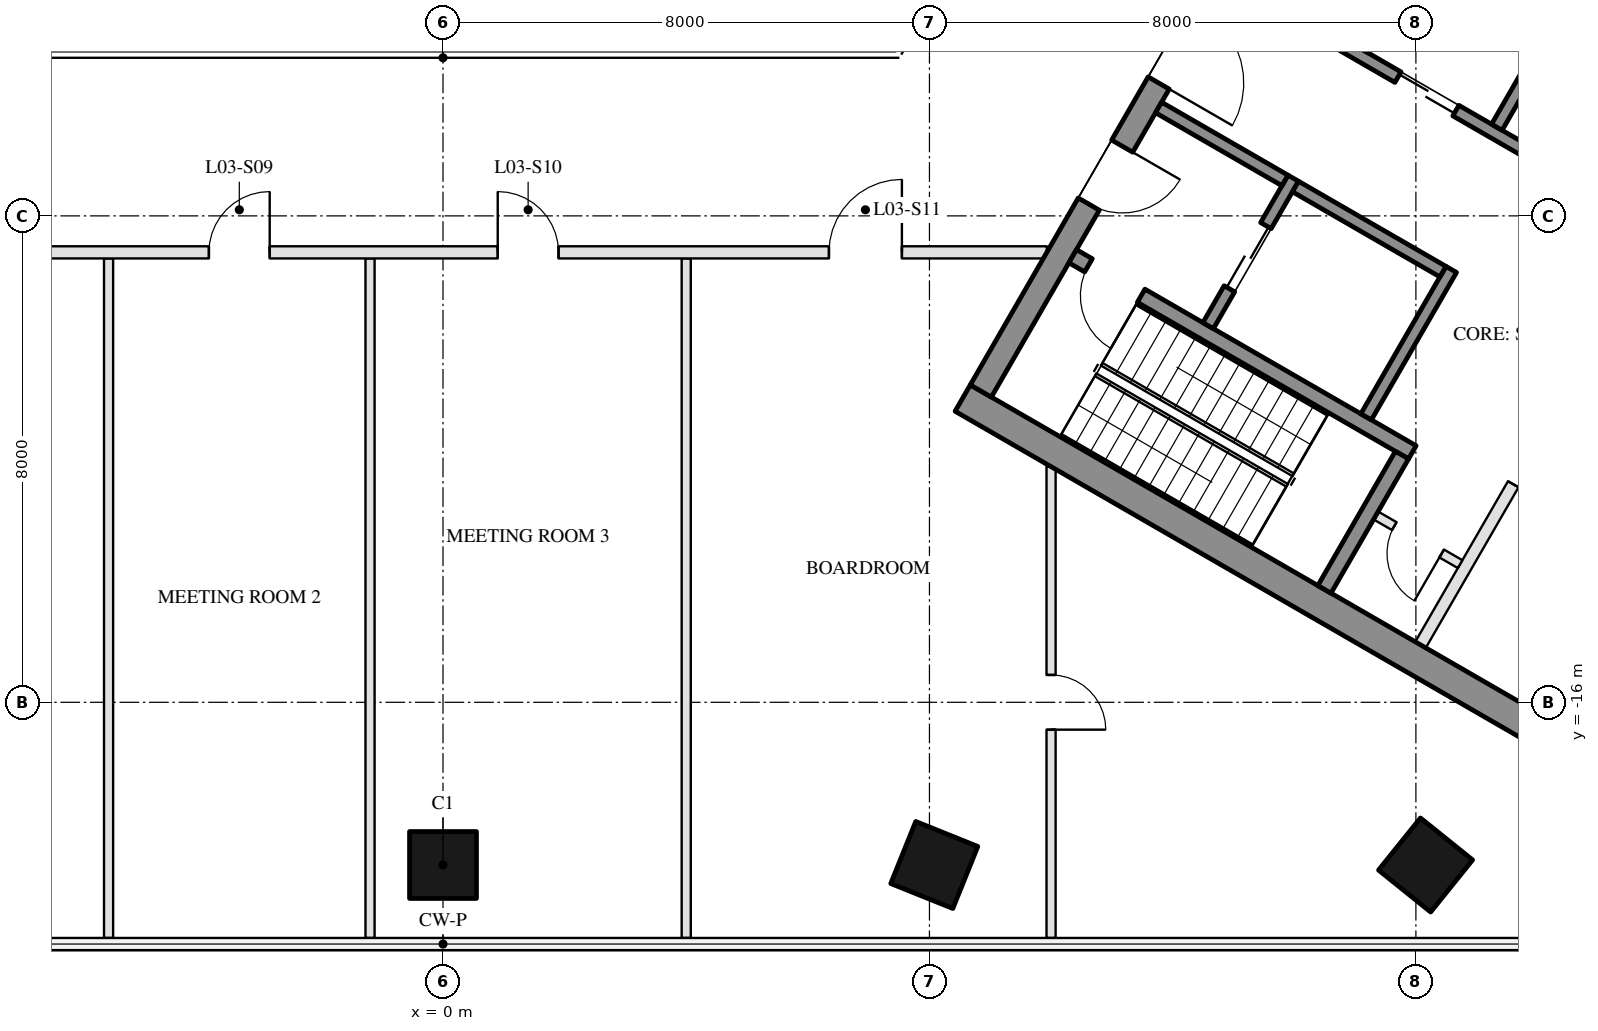
"""IFC4 building model, lengths in metres.
Left out: names, types, materials, properties, quantities, classifications, styles, units other than length and angle.
Written with IfcOpenShell. Run it as: python <this file> out.ifc"""

import sys

from ifc_helpers import new_model, si_unit, direction, frame, frame_2d, origin, origin_2d, place, context, subcontext, project, spatial, rectangle, hollow_rectangle, extrude, boolean, halfspace, element, fill, save


model = new_model("IFC4")
c1 = context("Model", 3, precision=1e-05, world=origin(), true_north=direction((0.0, 1.0)))
c2 = subcontext(c1, "Body", "Model", "MODEL_VIEW")
j1 = project(units=[si_unit("LENGTHUNIT", "METRE"), si_unit("PLANEANGLEUNIT", "RADIAN")], contexts=[c1])
p1 = place(None, origin())
s1 = spatial("IfcSite", under=j1, at=p1, CompositionType="ELEMENT")
p2 = place(p1, origin())
s2 = spatial("IfcBuilding", under=s1, at=p2, CompositionType="ELEMENT")
p3 = place(p2, frame((0.0, 0.0, 23.5)))
s3 = spatial("IfcBuildingStorey", under=s2, at=p3, CompositionType="ELEMENT", Elevation=23.5)
p4 = place(p3, frame((0.0, -18.676, 0.0), z_axis=(0.0, 0.052272189529, 0.998632874585), x_axis=(-1.0, 0.0, 0.0)))
e1 = element("IfcColumn", 1, at=p4, inside=s3, PredefinedType="COLUMN", context=c2, shape_type="SweptSolid", body=[
    boolean("DIFFERENCE", boolean("DIFFERENCE", extrude(hollow_rectangle(XDim=1.1, YDim=1.1, WallThickness=0.05, at=origin_2d()), origin(), (0.0, 0.0, 1.0), 5.007), halfspace(frame((0.0, 0.0, 0.013), z_axis=(0.0, 0.0, 1.0), x_axis=(1.0, 0.0, 0.0)), True)), halfspace(frame((0.0, 0.0, 4.996), z_axis=(0.0, 0.0, 1.0), x_axis=(1.0, 0.0, 0.0)), False)),
])
p5 = place(p3, frame((8.08, -18.676, 0.0), z_axis=(-0.021060240181, 0.052260596004, 0.998411386348), x_axis=(0.999778208433, 0.001085815533, 0.021032235927)))
e2 = element("IfcColumn", 2, at=p5, inside=s3, PredefinedType="COLUMN", context=c2, shape_type="SweptSolid", body=[
    boolean("DIFFERENCE", boolean("DIFFERENCE", extrude(hollow_rectangle(XDim=1.1, YDim=1.1, WallThickness=0.05, at=origin_2d()), origin(), (0.0, 0.0, 1.0), 5.008), halfspace(frame((0.0, 0.0, 0.014), z_axis=(0.0, 0.0, 1.0), x_axis=(1.0, 0.0, 0.0)), True)), halfspace(frame((0.0, 0.0, 4.997), z_axis=(0.0, 0.0, 1.0), x_axis=(1.0, 0.0, 0.0)), False)),
])
p6 = place(p3, frame((16.159, -18.676, 0.0), z_axis=(-0.041995221245, 0.052226075608, 0.997751892215), x_axis=(0.999116711053, 0.000712967272, 0.042015346876)))
e3 = element("IfcColumn", 3, at=p6, inside=s3, PredefinedType="COLUMN", context=c2, shape_type="SweptSolid", body=[
    boolean("DIFFERENCE", boolean("DIFFERENCE", extrude(hollow_rectangle(XDim=1.1, YDim=1.1, WallThickness=0.05, at=origin_2d()), origin(), (0.0, 0.0, 1.0), 5.011), halfspace(frame((0.0, 0.0, 0.017), z_axis=(0.0, 0.0, 1.0), x_axis=(1.0, 0.0, 0.0)), True)), halfspace(frame((0.0, 0.0, 4.999), z_axis=(0.0, 0.0, 1.0), x_axis=(1.0, 0.0, 0.0)), False)),
])
for number, where, z_axis, x_axis in (
    (4, (8.547, -10.997, 0.0), (0.0, 0.0, 1.0), (0.866, -0.5, 0.0)),
    (5, (13.797, -1.903, 0.0), (0.0, 0.0, 1.0), (0.866, -0.5, 0.0)),
):
    element("IfcWall", number, at=place(p3, frame(where, z_axis=z_axis, x_axis=x_axis)), inside=s3, PredefinedType="SHEAR", context=c2, shape_type="SweptSolid", body=[
        extrude(rectangle(XDim=15.542, YDim=0.5, at=frame_2d((7.771, 0.0))), origin(), (0.0, 0.0, 1.0), 4.7),
    ])
p7 = place(p3, frame((8.845, -10.88, 0.0), z_axis=(0.0, 0.0, 1.0), x_axis=(0.500004234368, 0.866022959057, 0.0)))
e6 = element("IfcWall", 6, at=p7, inside=s3, PredefinedType="SHEAR", context=c2, shape_type="SweptSolid", body=[
    extrude(rectangle(XDim=10.0, YDim=0.4, at=frame_2d((5.0, 0.0))), origin(), (0.0, 0.0, 1.0), 4.7),
])
p8 = place(p7, frame((3.55, 0.0, 0.0)))
e7 = element("IfcOpeningElement", 7, at=p8, cuts=e6, PredefinedType="OPENING", context=c2, shape_type="SweptSolid", body=[
    extrude(rectangle(XDim=1.1, YDim=2.1, at=frame_2d((0.55, 1.05))), frame((0.0, 0.21, 0.0), z_axis=(0.0, -1.0, 0.0), x_axis=(1.0, 0.0, 0.0)), (0.0, 0.0, 1.0), 0.42),
])
p9 = place(p7, frame((5.85, 0.0, 0.0)))
e8 = element("IfcOpeningElement", 8, at=p9, cuts=e6, PredefinedType="OPENING", context=c2, shape_type="SweptSolid", body=[
    extrude(rectangle(XDim=1.4, YDim=2.1, at=frame_2d((0.7, 1.05))), frame((0.0, 0.21, 0.0), z_axis=(0.0, -1.0, 0.0), x_axis=(1.0, 0.0, 0.0)), (0.0, 0.0, 1.0), 0.42),
])
p10 = place(p3, frame((10.356, -8.664, 0.0), z_axis=(0.0, 0.0, 1.0), x_axis=(0.866028629588, -0.499994412703, 0.0)))
e9 = element("IfcWall", 9, at=p10, inside=s3, PredefinedType="SHEAR", context=c2, shape_type="SweptSolid", body=[
    extrude(rectangle(XDim=6.45, YDim=0.25, at=frame_2d((3.225, 0.0))), origin(), (0.0, 0.0, 1.0), 4.7),
])
p11 = place(p10, frame((0.3, 0.0, 0.0)))
e10 = element("IfcOpeningElement", 10, at=p11, cuts=e9, PredefinedType="OPENING", context=c2, shape_type="SweptSolid", body=[
    extrude(rectangle(XDim=1.0, YDim=2.1, at=frame_2d((0.5, 1.05))), frame((0.0, 0.135, 0.0), z_axis=(0.0, -1.0, 0.0), x_axis=(1.0, 0.0, 0.0)), (0.0, 0.0, 1.0), 0.27),
])
p12 = place(p3, frame((14.496, -14.143, 0.0), z_axis=(0.0, 0.0, 1.0), x_axis=(0.500062241894, 0.865989465428, 0.0)))
e11 = element("IfcWall", 11, at=p12, inside=s3, PredefinedType="SHEAR", context=c2, shape_type="SweptSolid", body=[
    extrude(rectangle(XDim=2.55, YDim=0.25, at=frame_2d((1.275, 0.0))), origin(), (0.0, 0.0, 1.0), 4.7),
])
p13 = place(p3, frame((15.181, -11.305, 0.0), z_axis=(0.0, 0.0, 1.0), x_axis=(0.49994636267, 0.866056369097, 0.0)))
e12 = element("IfcWall", 12, at=p13, inside=s3, PredefinedType="SHEAR", context=c2, shape_type="SweptSolid", body=[
    extrude(rectangle(XDim=2.8, YDim=0.2, at=frame_2d((1.4, 0.0))), origin(), (0.0, 0.0, 1.0), 4.7),
])
p14 = place(p3, frame((12.583, -9.805, 0.0), z_axis=(0.0, 0.0, 1.0), x_axis=(0.49994636267, 0.866056369097, 0.0)))
e13 = element("IfcWall", 13, at=p14, inside=s3, PredefinedType="SHEAR", context=c2, shape_type="SweptSolid", body=[
    extrude(rectangle(XDim=2.8, YDim=0.2, at=frame_2d((1.4, 0.0))), origin(), (0.0, 0.0, 1.0), 4.7),
])
p15 = place(p14, frame((0.7, 0.0, 0.0)))
e14 = element("IfcOpeningElement", 14, at=p15, cuts=e13, PredefinedType="OPENING", context=c2, shape_type="SweptSolid", body=[
    extrude(rectangle(XDim=1.2, YDim=2.1, at=frame_2d((0.6, 1.05))), frame((0.0, 0.11, 0.0), z_axis=(0.0, -1.0, 0.0), x_axis=(1.0, 0.0, 0.0)), (0.0, 0.0, 1.0), 0.22),
])
p16 = place(p3, frame((11.768, -6.217, 0.0), z_axis=(0.0, 0.0, 1.0), x_axis=(0.866050077142, -0.499957262057, 0.0)))
e15 = element("IfcWall", 15, at=p16, inside=s3, PredefinedType="SHEAR", context=c2, shape_type="SweptSolid", body=[
    extrude(rectangle(XDim=2.4, YDim=0.2, at=frame_2d((1.2, 0.0))), origin(), (0.0, 0.0, 1.0), 4.7),
])
p17 = place(p3, frame((14.02, -7.517, 0.0), z_axis=(0.0, 0.0, 1.0), x_axis=(0.866034573852, -0.49998411664, 0.0)))
e16 = element("IfcWall", 16, at=p17, inside=s3, PredefinedType="SHEAR", context=c2, shape_type="SweptSolid", body=[
    extrude(rectangle(XDim=2.8, YDim=0.2, at=frame_2d((1.4, 0.0))), origin(), (0.0, 0.0, 1.0), 4.7),
])
p18 = place(p3, frame((12.968, -4.138, 0.0), z_axis=(0.0, 0.0, 1.0), x_axis=(0.866028328073, -0.49999493495, 0.0)))
e17 = element("IfcWall", 17, at=p18, inside=s3, PredefinedType="SHEAR", context=c2, shape_type="SweptSolid", body=[
    extrude(rectangle(XDim=10.16, YDim=0.2, at=frame_2d((5.08, 0.0))), origin(), (0.0, 0.0, 1.0), 4.7),
])
p19 = place(p18, frame((0.62, 0.0, 0.0)))
e18 = element("IfcOpeningElement", 18, at=p19, cuts=e17, PredefinedType="OPENING", context=c2, shape_type="SweptSolid", body=[
    extrude(rectangle(XDim=1.1, YDim=2.1, at=frame_2d((0.55, 1.05))), frame((0.0, 0.11, 0.0), z_axis=(0.0, -1.0, 0.0), x_axis=(1.0, 0.0, 0.0)), (0.0, 0.0, 1.0), 0.22),
])
p20 = place(p18, frame((3.16, 0.0, 0.0)))
e19 = element("IfcOpeningElement", 19, at=p20, cuts=e17, PredefinedType="OPENING", context=c2, shape_type="SweptSolid", body=[
    extrude(rectangle(XDim=1.1, YDim=2.1, at=frame_2d((0.55, 1.05))), frame((0.0, 0.11, 0.0), z_axis=(0.0, -1.0, 0.0), x_axis=(1.0, 0.0, 0.0)), (0.0, 0.0, 1.0), 0.22),
])
p21 = place(p18, frame((5.7, 0.0, 0.0)))
e20 = element("IfcOpeningElement", 20, at=p21, cuts=e17, PredefinedType="OPENING", context=c2, shape_type="SweptSolid", body=[
    extrude(rectangle(XDim=1.1, YDim=2.1, at=frame_2d((0.55, 1.05))), frame((0.0, 0.11, 0.0), z_axis=(0.0, -1.0, 0.0), x_axis=(1.0, 0.0, 0.0)), (0.0, 0.0, 1.0), 0.22),
])
p22 = place(p18, frame((8.24, 0.0, 0.0)))
e21 = element("IfcOpeningElement", 21, at=p22, cuts=e17, PredefinedType="OPENING", context=c2, shape_type="SweptSolid", body=[
    extrude(rectangle(XDim=1.1, YDim=2.1, at=frame_2d((0.55, 1.05))), frame((0.0, 0.11, 0.0), z_axis=(0.0, -1.0, 0.0), x_axis=(1.0, 0.0, 0.0)), (0.0, 0.0, 1.0), 0.22),
])
for number, where, z_axis, x_axis in (
    (22, (15.131, -5.272, 0.0), (0.0, 0.0, 1.0), (0.5, 0.866, 0.0)),
    (23, (17.331, -6.542, 0.0), (0.0, 0.0, 1.0), (0.5, 0.866, 0.0)),
):
    element("IfcWall", number, at=place(p3, frame(where, z_axis=z_axis, x_axis=x_axis)), inside=s3, PredefinedType="SHEAR", context=c2, shape_type="SweptSolid", body=[
        extrude(rectangle(XDim=2.0, YDim=0.2, at=frame_2d((1.0, 0.0))), origin(), (0.0, 0.0, 1.0), 4.7),
    ])
p23 = place(p3, frame((16.076, -15.055, 0.0), z_axis=(0.0, 0.0, 1.0), x_axis=(0.499995103361, 0.866028230842, 0.0)))
e24 = element("IfcWall", 24, at=p23, inside=s3, PredefinedType="PARTITIONING", context=c2, shape_type="SweptSolid", body=[
    extrude(rectangle(XDim=5.4, YDim=0.2, at=frame_2d((2.7, 0.0))), origin(), (0.0, 0.0, 1.0), 4.7),
])
p24 = place(p23, frame((3.05, 0.0, 0.0)))
e25 = element("IfcOpeningElement", 25, at=p24, cuts=e24, PredefinedType="OPENING", context=c2, shape_type="SweptSolid", body=[
    extrude(rectangle(XDim=0.9, YDim=2.1, at=frame_2d((0.45, 1.05))), frame((0.0, 0.11, 0.0), z_axis=(0.0, -1.0, 0.0), x_axis=(1.0, 0.0, 0.0)), (0.0, 0.0, 1.0), 0.22),
])
p25 = place(p3, frame((15.342, -12.928, 0.0), z_axis=(0.0, 0.0, 1.0), x_axis=(0.865989903783, -0.500061482766, 0.0)))
e26 = element("IfcWall", 26, at=p25, inside=s3, PredefinedType="PARTITIONING", context=c2, shape_type="SweptSolid", body=[
    extrude(rectangle(XDim=1.6, YDim=0.15, at=frame_2d((0.8, 0.0))), origin(), (0.0, 0.0, 1.0), 4.7),
])
p26 = place(p25, frame((0.35, 0.0, 0.0)))
e27 = element("IfcOpeningElement", 27, at=p26, cuts=e26, PredefinedType="OPENING", context=c2, shape_type="SweptSolid", body=[
    extrude(rectangle(XDim=0.9, YDim=2.1, at=frame_2d((0.45, 1.05))), frame((0.0, 0.085, 0.0), z_axis=(0.0, -1.0, 0.0), x_axis=(1.0, 0.0, 0.0)), (0.0, 0.0, 1.0), 0.17),
])
for number, where, z_axis, x_axis in (
    (28, (-5.5, -19.876, 0.0), (0.0, 0.0, 1.0), (0.0, 1.0, 0.0)),
    (29, (-1.2, -19.876, 0.0), (0.0, 0.0, 1.0), (0.0, 1.0, 0.0)),
):
    element("IfcWall", number, at=place(p3, frame(where, z_axis=z_axis, x_axis=x_axis)), inside=s3, PredefinedType="PARTITIONING", context=c2, shape_type="SweptSolid", body=[
        extrude(rectangle(XDim=11.176, YDim=0.15, at=frame_2d((5.588, 0.0))), origin(), (0.0, 0.0, 1.0), 4.1),
    ])
p27 = place(p3, frame((4.0, -19.876, 0.0), z_axis=(0.0, 0.0, 1.0), x_axis=(0.0, 1.0, 0.0)))
e30 = element("IfcWall", 30, at=p27, inside=s3, PredefinedType="PARTITIONING", context=c2, shape_type="SweptSolid", body=[
    extrude(rectangle(XDim=11.176, YDim=0.15, at=frame_2d((5.588, 0.0))), origin(), (0.0, 0.0, 1.0), 3.91),
])
p28 = place(p3, frame((10.0, -19.876, 0.0), z_axis=(0.0, 0.0, 1.0), x_axis=(0.0, 1.0, 0.0)))
e31 = element("IfcWall", 31, at=p28, inside=s3, PredefinedType="PARTITIONING", context=c2, shape_type="SweptSolid", body=[
    extrude(rectangle(XDim=7.752, YDim=0.15, at=frame_2d((3.876, 0.0))), origin(), (0.0, 0.0, 1.0), 4.1),
])
p29 = place(p28, frame((3.426, 0.0, 0.0)))
e32 = element("IfcOpeningElement", 32, at=p29, cuts=e31, PredefinedType="OPENING", context=c2, shape_type="SweptSolid", body=[
    extrude(rectangle(XDim=0.9, YDim=2.1, at=frame_2d((0.45, 1.05))), frame((0.0, 0.085, 0.0), z_axis=(0.0, -1.0, 0.0), x_axis=(1.0, 0.0, 0.0)), (0.0, 0.0, 1.0), 0.17),
])
p30 = place(p3, frame((-9.93, -8.6, 0.0), z_axis=(0.0, 0.0, 1.0), x_axis=(1.0, 0.0, 0.0)))
e33 = element("IfcWall", 33, at=p30, inside=s3, PredefinedType="PARTITIONING", context=c2, shape_type="SweptSolid", body=[
    extrude(rectangle(XDim=19.861, YDim=0.2, at=frame_2d((9.93, 0.0))), origin(), (0.0, 0.0, 1.0), 3.91),
])
p31 = place(p30, frame((1.734, 0.0, 0.0)))
e34 = element("IfcOpeningElement", 34, at=p31, cuts=e33, PredefinedType="OPENING", context=c2, shape_type="SweptSolid", body=[
    extrude(rectangle(XDim=1.0, YDim=2.1, at=frame_2d((0.5, 1.05))), frame((0.0, 0.11, 0.0), z_axis=(0.0, -1.0, 0.0), x_axis=(1.0, 0.0, 0.0)), (0.0, 0.0, 1.0), 0.22),
])
p32 = place(p30, frame((6.081, 0.0, 0.0)))
e35 = element("IfcOpeningElement", 35, at=p32, cuts=e33, PredefinedType="OPENING", context=c2, shape_type="SweptSolid", body=[
    extrude(rectangle(XDim=1.0, YDim=2.1, at=frame_2d((0.5, 1.05))), frame((0.0, 0.11, 0.0), z_axis=(0.0, -1.0, 0.0), x_axis=(1.0, 0.0, 0.0)), (0.0, 0.0, 1.0), 0.22),
])
p33 = place(p30, frame((10.831, 0.0, 0.0)))
e36 = element("IfcOpeningElement", 36, at=p33, cuts=e33, PredefinedType="OPENING", context=c2, shape_type="SweptSolid", body=[
    extrude(rectangle(XDim=1.0, YDim=2.1, at=frame_2d((0.5, 1.05))), frame((0.0, 0.11, 0.0), z_axis=(0.0, -1.0, 0.0), x_axis=(1.0, 0.0, 0.0)), (0.0, 0.0, 1.0), 0.22),
])
p34 = place(p30, frame((16.278, 0.0, 0.0)))
e37 = element("IfcOpeningElement", 37, at=p34, cuts=e33, PredefinedType="OPENING", context=c2, shape_type="SweptSolid", body=[
    extrude(rectangle(XDim=1.2, YDim=2.1, at=frame_2d((0.6, 1.05))), frame((0.0, 0.11, 0.0), z_axis=(0.0, -1.0, 0.0), x_axis=(1.0, 0.0, 0.0)), (0.0, 0.0, 1.0), 0.22),
])
p35 = place(p15, origin())
e38 = element("IfcDoor", 38, at=p35, inside=s3, OperationType="DOUBLE_DOOR_SLIDING", PredefinedType="DOOR", context=c2, shape_type="SweptSolid", body=[
    extrude(rectangle(XDim=1.2, YDim=2.1, at=frame_2d((0.6, 1.05))), frame((0.0, 0.025, 0.0), z_axis=(0.0, -1.0, 0.0), x_axis=(1.0, 0.0, 0.0)), (0.0, 0.0, 1.0), 0.05),
])
fill(e14, e38)
p36 = place(p26, frame((0.9, 0.0, 0.0), z_axis=(0.0, 0.0, 1.0), x_axis=(-1.0, 0.0, 0.0)))
e39 = element("IfcDoor", 39, at=p36, inside=s3, OperationType="SINGLE_SWING_LEFT", PredefinedType="DOOR", context=c2, shape_type="SweptSolid", body=[
    extrude(rectangle(XDim=0.9, YDim=2.1, at=frame_2d((0.45, 1.05))), frame((0.0, 0.025, 0.0), z_axis=(0.0, -1.0, 0.0), x_axis=(1.0, 0.0, 0.0)), (0.0, 0.0, 1.0), 0.05),
])
fill(e27, e39)
p37 = place(p20, origin())
e40 = element("IfcDoor", 40, at=p37, inside=s3, OperationType="DOUBLE_DOOR_SLIDING", PredefinedType="DOOR", context=c2, shape_type="SweptSolid", body=[
    extrude(rectangle(XDim=1.1, YDim=2.1, at=frame_2d((0.55, 1.05))), frame((0.0, 0.025, 0.0), z_axis=(0.0, -1.0, 0.0), x_axis=(1.0, 0.0, 0.0)), (0.0, 0.0, 1.0), 0.05),
])
fill(e19, e40)
p38 = place(p24, frame((0.9, 0.0, 0.0), z_axis=(0.0, 0.0, 1.0), x_axis=(-1.0, 0.0, 0.0)))
e41 = element("IfcDoor", 41, at=p38, inside=s3, OperationType="SINGLE_SWING_LEFT", PredefinedType="DOOR", context=c2, shape_type="SweptSolid", body=[
    extrude(rectangle(XDim=0.9, YDim=2.1, at=frame_2d((0.45, 1.05))), frame((0.0, 0.025, 0.0), z_axis=(0.0, -1.0, 0.0), x_axis=(1.0, 0.0, 0.0)), (0.0, 0.0, 1.0), 0.05),
])
fill(e25, e41)
p39 = place(p8, frame((1.1, 0.0, 0.0), z_axis=(0.0, 0.0, 1.0), x_axis=(-1.0, 0.0, 0.0)))
e42 = element("IfcDoor", 42, at=p39, inside=s3, OperationType="SINGLE_SWING_LEFT", PredefinedType="DOOR", context=c2, shape_type="SweptSolid", body=[
    extrude(rectangle(XDim=1.1, YDim=2.1, at=frame_2d((0.55, 1.05))), frame((0.0, 0.025, 0.0), z_axis=(0.0, -1.0, 0.0), x_axis=(1.0, 0.0, 0.0)), (0.0, 0.0, 1.0), 0.05),
])
fill(e7, e42)
p40 = place(p9, frame((1.4, 0.0, 0.0), z_axis=(0.0, 0.0, 1.0), x_axis=(-1.0, 0.0, 0.0)))
e43 = element("IfcDoor", 43, at=p40, inside=s3, OperationType="DOUBLE_DOOR_SINGLE_SWING", PredefinedType="DOOR", context=c2, shape_type="SweptSolid", body=[
    extrude(rectangle(XDim=1.4, YDim=2.1, at=frame_2d((0.7, 1.05))), frame((0.0, 0.025, 0.0), z_axis=(0.0, -1.0, 0.0), x_axis=(1.0, 0.0, 0.0)), (0.0, 0.0, 1.0), 0.05),
])
fill(e8, e43)
p41 = place(p11, frame((1.0, 0.0, 0.0), z_axis=(0.0, 0.0, 1.0), x_axis=(-1.0, 0.0, 0.0)))
e44 = element("IfcDoor", 44, at=p41, inside=s3, OperationType="SINGLE_SWING_LEFT", PredefinedType="DOOR", context=c2, shape_type="SweptSolid", body=[
    extrude(rectangle(XDim=1.0, YDim=2.1, at=frame_2d((0.5, 1.05))), frame((0.0, 0.025, 0.0), z_axis=(0.0, -1.0, 0.0), x_axis=(1.0, 0.0, 0.0)), (0.0, 0.0, 1.0), 0.05),
])
fill(e10, e44)
p42 = place(p32, origin())
e45 = element("IfcDoor", 45, at=p42, inside=s3, OperationType="SINGLE_SWING_RIGHT", PredefinedType="DOOR", context=c2, shape_type="SweptSolid", body=[
    extrude(rectangle(XDim=1.0, YDim=2.1, at=frame_2d((0.5, 1.05))), frame((0.0, 0.025, 0.0), z_axis=(0.0, -1.0, 0.0), x_axis=(1.0, 0.0, 0.0)), (0.0, 0.0, 1.0), 0.05),
])
fill(e35, e45)
p43 = place(p33, origin())
e46 = element("IfcDoor", 46, at=p43, inside=s3, OperationType="SINGLE_SWING_LEFT", PredefinedType="DOOR", context=c2, shape_type="SweptSolid", body=[
    extrude(rectangle(XDim=1.0, YDim=2.1, at=frame_2d((0.5, 1.05))), frame((0.0, 0.025, 0.0), z_axis=(0.0, -1.0, 0.0), x_axis=(1.0, 0.0, 0.0)), (0.0, 0.0, 1.0), 0.05),
])
fill(e36, e46)
p44 = place(p34, origin())
e47 = element("IfcDoor", 47, at=p44, inside=s3, OperationType="SINGLE_SWING_RIGHT", PredefinedType="DOOR", context=c2, shape_type="SweptSolid", body=[
    extrude(rectangle(XDim=1.2, YDim=2.1, at=frame_2d((0.6, 1.05))), frame((0.0, 0.025, 0.0), z_axis=(0.0, -1.0, 0.0), x_axis=(1.0, 0.0, 0.0)), (0.0, 0.0, 1.0), 0.05),
])
fill(e37, e47)
p45 = place(p29, frame((0.9, 0.0, 0.0), z_axis=(0.0, 0.0, 1.0), x_axis=(-1.0, 0.0, 0.0)))
e48 = element("IfcDoor", 48, at=p45, inside=s3, OperationType="SINGLE_SWING_RIGHT", PredefinedType="DOOR", context=c2, shape_type="SweptSolid", body=[
    extrude(rectangle(XDim=0.9, YDim=2.1, at=frame_2d((0.45, 1.05))), frame((0.0, 0.025, 0.0), z_axis=(0.0, -1.0, 0.0), x_axis=(1.0, 0.0, 0.0)), (0.0, 0.0, 1.0), 0.05),
])
fill(e32, e48)
save(model, sys.argv[1])
